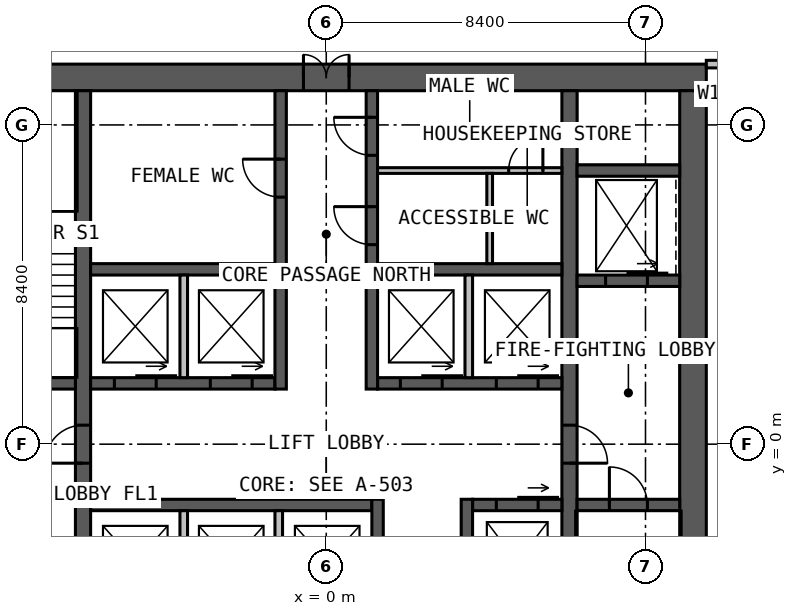
"""IFC4 building model, lengths in metres.
Left out: names, types, materials, properties, quantities, classifications, styles, units other than length and angle.
Written with IfcOpenShell. Run it as: python <this file> out.ifc"""

import sys

from ifc_helpers import new_model, si_unit, direction, frame, frame_2d, origin, place, context, subcontext, project, spatial, rectangle, extrude, element, fill, save


model = new_model("IFC4")
c1 = context("Model", 3, precision=1e-05, world=origin(), true_north=direction((0.0, 1.0)))
c2 = subcontext(c1, "Body", "Model", "MODEL_VIEW")
j1 = project(units=[si_unit("LENGTHUNIT", "METRE"), si_unit("PLANEANGLEUNIT", "RADIAN")], contexts=[c1])
p1 = place(None, origin())
s1 = spatial("IfcSite", under=j1, at=p1, CompositionType="ELEMENT")
p2 = place(p1, origin())
s2 = spatial("IfcBuilding", under=s1, at=p2, CompositionType="ELEMENT")
p3 = place(p2, frame((0.0, 0.0, 98.0)))
s3 = spatial("IfcBuildingStorey", under=s2, at=p3, CompositionType="ELEMENT", Elevation=98.0)
p4 = place(p3, frame((-10.0, 9.65, 0.0), z_axis=(0.0, 0.0, 1.0), x_axis=(1.0, 0.0, 0.0)))
e1 = element("IfcWall", 1, at=p4, inside=s3, PredefinedType="SOLIDWALL", context=c2, shape_type="SweptSolid", body=[
    extrude(rectangle(XDim=20.0, YDim=0.7, at=frame_2d((10.0, 0.0))), origin(), (0.0, 0.0, 1.0), 4.0),
])
p5 = place(p4, frame((9.4, 0.0, 0.0)))
e2 = element("IfcOpeningElement", 2, at=p5, cuts=e1, PredefinedType="OPENING", context=c2, shape_type="SweptSolid", body=[
    extrude(rectangle(XDim=1.2, YDim=2.2, at=frame_2d((0.6, 1.1))), frame((0.0, 0.36, 0.0), z_axis=(0.0, -1.0, 0.0), x_axis=(1.0, 0.0, 0.0)), (0.0, 0.0, 1.0), 0.72),
])
p6 = place(p3, frame((9.65, -9.3, 0.0), z_axis=(0.0, 0.0, 1.0), x_axis=(0.0, 1.0, 0.0)))
e3 = element("IfcWall", 3, at=p6, inside=s3, PredefinedType="SOLIDWALL", context=c2, shape_type="SweptSolid", body=[
    extrude(rectangle(XDim=18.6, YDim=0.7, at=frame_2d((9.3, 0.0))), origin(), (0.0, 0.0, 1.0), 4.0),
])
p7 = place(p3, frame((-6.4, -9.3, 0.0), z_axis=(0.0, 0.0, 1.0), x_axis=(0.0, 1.0, 0.0)))
e4 = element("IfcWall", 4, at=p7, inside=s3, PredefinedType="SOLIDWALL", context=c2, shape_type="SweptSolid", body=[
    extrude(rectangle(XDim=18.6, YDim=0.4, at=frame_2d((9.3, 0.0))), origin(), (0.0, 0.0, 1.0), 4.0),
])
p8 = place(p7, frame((8.8, 0.0, 0.0)))
e5 = element("IfcOpeningElement", 5, at=p8, cuts=e4, PredefinedType="OPENING", context=c2, shape_type="SweptSolid", body=[
    extrude(rectangle(XDim=1.0, YDim=2.2, at=frame_2d((0.5, 1.1))), frame((0.0, 0.21, 0.0), z_axis=(0.0, -1.0, 0.0), x_axis=(1.0, 0.0, 0.0)), (0.0, 0.0, 1.0), 0.42),
])
p9 = place(p3, frame((6.4, 9.3, 0.0), z_axis=(0.0, 0.0, 1.0), x_axis=(0.0, -1.0, 0.0)))
e6 = element("IfcWall", 6, at=p9, inside=s3, PredefinedType="SOLIDWALL", context=c2, shape_type="SweptSolid", body=[
    extrude(rectangle(XDim=18.6, YDim=0.4, at=frame_2d((9.3, 0.0))), origin(), (0.0, 0.0, 1.0), 4.0),
])
p10 = place(p9, frame((8.8, 0.0, 0.0)))
e7 = element("IfcOpeningElement", 7, at=p10, cuts=e6, PredefinedType="OPENING", context=c2, shape_type="SweptSolid", body=[
    extrude(rectangle(XDim=1.0, YDim=2.2, at=frame_2d((0.5, 1.1))), frame((0.0, 0.21, 0.0), z_axis=(0.0, -1.0, 0.0), x_axis=(1.0, 0.0, 0.0)), (0.0, 0.0, 1.0), 0.42),
])
p11 = place(p3, frame((-6.2, 1.6, 0.0), z_axis=(0.0, 0.0, 1.0), x_axis=(1.0, 0.0, 0.0)))
e8 = element("IfcWall", 8, at=p11, inside=s3, PredefinedType="SOLIDWALL", context=c2, shape_type="SweptSolid", body=[
    extrude(rectangle(XDim=4.85, YDim=0.3, at=frame_2d((2.425, 0.0))), origin(), (0.0, 0.0, 1.0), 4.0),
])
p12 = place(p11, frame((0.625, 0.0, 0.0)))
e9 = element("IfcOpeningElement", 9, at=p12, cuts=e8, PredefinedType="OPENING", context=c2, shape_type="SweptSolid", body=[
    extrude(rectangle(XDim=1.1, YDim=2.2, at=frame_2d((0.55, 1.1))), frame((0.0, 0.16, 0.0), z_axis=(0.0, -1.0, 0.0), x_axis=(1.0, 0.0, 0.0)), (0.0, 0.0, 1.0), 0.32),
])
p13 = place(p11, frame((3.15, 0.0, 0.0)))
e10 = element("IfcOpeningElement", 10, at=p13, cuts=e8, PredefinedType="OPENING", context=c2, shape_type="SweptSolid", body=[
    extrude(rectangle(XDim=1.1, YDim=2.2, at=frame_2d((0.55, 1.1))), frame((0.0, 0.16, 0.0), z_axis=(0.0, -1.0, 0.0), x_axis=(1.0, 0.0, 0.0)), (0.0, 0.0, 1.0), 0.32),
])
p14 = place(p3, frame((1.35, 1.6, 0.0), z_axis=(0.0, 0.0, 1.0), x_axis=(1.0, 0.0, 0.0)))
e11 = element("IfcWall", 11, at=p14, inside=s3, PredefinedType="SOLIDWALL", context=c2, shape_type="SweptSolid", body=[
    extrude(rectangle(XDim=4.85, YDim=0.3, at=frame_2d((2.425, 0.0))), origin(), (0.0, 0.0, 1.0), 4.0),
])
p15 = place(p14, frame((0.6, 0.0, 0.0)))
e12 = element("IfcOpeningElement", 12, at=p15, cuts=e11, PredefinedType="OPENING", context=c2, shape_type="SweptSolid", body=[
    extrude(rectangle(XDim=1.1, YDim=2.2, at=frame_2d((0.55, 1.1))), frame((0.0, 0.16, 0.0), z_axis=(0.0, -1.0, 0.0), x_axis=(1.0, 0.0, 0.0)), (0.0, 0.0, 1.0), 0.32),
])
p16 = place(p14, frame((3.125, 0.0, 0.0)))
e13 = element("IfcOpeningElement", 13, at=p16, cuts=e11, PredefinedType="OPENING", context=c2, shape_type="SweptSolid", body=[
    extrude(rectangle(XDim=1.1, YDim=2.2, at=frame_2d((0.55, 1.1))), frame((0.0, 0.16, 0.0), z_axis=(0.0, -1.0, 0.0), x_axis=(1.0, 0.0, 0.0)), (0.0, 0.0, 1.0), 0.32),
])
for number, where, z_axis, x_axis in (
    (14, (-6.2, 4.6, 0.0), (0.0, 0.0, 1.0), (1.0, 0.0, 0.0)),
    (15, (1.35, 4.6, 0.0), (0.0, 0.0, 1.0), (1.0, 0.0, 0.0)),
):
    element("IfcWall", number, at=place(p3, frame(where, z_axis=z_axis, x_axis=x_axis)), inside=s3, PredefinedType="SOLIDWALL", context=c2, shape_type="SweptSolid", body=[
        extrude(rectangle(XDim=4.85, YDim=0.3, at=frame_2d((2.425, 0.0))), origin(), (0.0, 0.0, 1.0), 4.0),
    ])
p17 = place(p3, frame((-1.2, 1.45, 0.0), z_axis=(0.0, 0.0, 1.0), x_axis=(0.0, 1.0, 0.0)))
e16 = element("IfcWall", 16, at=p17, inside=s3, PredefinedType="SOLIDWALL", context=c2, shape_type="SweptSolid", body=[
    extrude(rectangle(XDim=7.85, YDim=0.3, at=frame_2d((3.925, 0.0))), origin(), (0.0, 0.0, 1.0), 4.0),
])
p18 = place(p17, frame((5.05, 0.0, 0.0)))
e17 = element("IfcOpeningElement", 17, at=p18, cuts=e16, PredefinedType="OPENING", context=c2, shape_type="SweptSolid", body=[
    extrude(rectangle(XDim=1.0, YDim=2.2, at=frame_2d((0.5, 1.1))), frame((0.0, 0.16, 0.0), z_axis=(0.0, -1.0, 0.0), x_axis=(1.0, 0.0, 0.0)), (0.0, 0.0, 1.0), 0.32),
])
p19 = place(p3, frame((1.2, 1.45, 0.0), z_axis=(0.0, 0.0, 1.0), x_axis=(0.0, 1.0, 0.0)))
e18 = element("IfcWall", 18, at=p19, inside=s3, PredefinedType="SOLIDWALL", context=c2, shape_type="SweptSolid", body=[
    extrude(rectangle(XDim=7.85, YDim=0.3, at=frame_2d((3.925, 0.0))), origin(), (0.0, 0.0, 1.0), 4.0),
])
p20 = place(p19, frame((3.8, 0.0, 0.0)))
e19 = element("IfcOpeningElement", 19, at=p20, cuts=e18, PredefinedType="OPENING", context=c2, shape_type="SweptSolid", body=[
    extrude(rectangle(XDim=1.0, YDim=2.2, at=frame_2d((0.5, 1.1))), frame((0.0, 0.16, 0.0), z_axis=(0.0, -1.0, 0.0), x_axis=(1.0, 0.0, 0.0)), (0.0, 0.0, 1.0), 0.32),
])
p21 = place(p19, frame((6.15, 0.0, 0.0)))
e20 = element("IfcOpeningElement", 20, at=p21, cuts=e18, PredefinedType="OPENING", context=c2, shape_type="SweptSolid", body=[
    extrude(rectangle(XDim=1.0, YDim=2.2, at=frame_2d((0.5, 1.1))), frame((0.0, 0.16, 0.0), z_axis=(0.0, -1.0, 0.0), x_axis=(1.0, 0.0, 0.0)), (0.0, 0.0, 1.0), 0.32),
])
p22 = place(p3, frame((-6.2, -1.6, 0.0), z_axis=(0.0, 0.0, 1.0), x_axis=(1.0, 0.0, 0.0)))
e21 = element("IfcWall", 21, at=p22, inside=s3, PredefinedType="SOLIDWALL", context=c2, shape_type="SweptSolid", body=[
    extrude(rectangle(XDim=7.4, YDim=0.3, at=frame_2d((3.7, 0.0))), origin(), (0.0, 0.0, 1.0), 4.0),
])
p23 = place(p3, frame((3.85, -1.6, 0.0), z_axis=(0.0, 0.0, 1.0), x_axis=(1.0, 0.0, 0.0)))
e22 = element("IfcWall", 22, at=p23, inside=s3, PredefinedType="SOLIDWALL", context=c2, shape_type="SweptSolid", body=[
    extrude(rectangle(XDim=2.35, YDim=0.3, at=frame_2d((1.175, 0.0))), origin(), (0.0, 0.0, 1.0), 4.0),
])
p24 = place(p23, frame((0.625, 0.0, 0.0)))
e23 = element("IfcOpeningElement", 23, at=p24, cuts=e22, PredefinedType="OPENING", context=c2, shape_type="SweptSolid", body=[
    extrude(rectangle(XDim=1.1, YDim=2.2, at=frame_2d((0.55, 1.1))), frame((0.0, 0.16, 0.0), z_axis=(0.0, -1.0, 0.0), x_axis=(1.0, 0.0, 0.0)), (0.0, 0.0, 1.0), 0.32),
])
p25 = place(p3, frame((1.35, -1.45, 0.0), z_axis=(0.0, 0.0, 1.0), x_axis=(0.0, -1.0, 0.0)))
e24 = element("IfcWall", 24, at=p25, inside=s3, PredefinedType="SOLIDWALL", context=c2, shape_type="SweptSolid", body=[
    extrude(rectangle(XDim=7.85, YDim=0.3, at=frame_2d((3.925, 0.0))), origin(), (0.0, 0.0, 1.0), 4.0),
])
p26 = place(p25, frame((5.85, 0.0, 0.0)))
e25 = element("IfcOpeningElement", 25, at=p26, cuts=e24, PredefinedType="OPENING", context=c2, shape_type="SweptSolid", body=[
    extrude(rectangle(XDim=1.0, YDim=2.2, at=frame_2d((0.5, 1.1))), frame((0.0, 0.16, 0.0), z_axis=(0.0, -1.0, 0.0), x_axis=(1.0, 0.0, 0.0)), (0.0, 0.0, 1.0), 0.32),
])
p27 = place(p25, frame((3.525, 0.0, 0.0)))
e26 = element("IfcOpeningElement", 26, at=p27, cuts=e24, PredefinedType="OPENING", context=c2, shape_type="SweptSolid", body=[
    extrude(rectangle(XDim=0.9, YDim=2.2, at=frame_2d((0.45, 1.1))), frame((0.0, 0.16, 0.0), z_axis=(0.0, -1.0, 0.0), x_axis=(1.0, 0.0, 0.0)), (0.0, 0.0, 1.0), 0.32),
])
p28 = place(p3, frame((3.7, -1.45, 0.0), z_axis=(0.0, 0.0, 1.0), x_axis=(0.0, -1.0, 0.0)))
e27 = element("IfcWall", 27, at=p28, inside=s3, PredefinedType="SOLIDWALL", context=c2, shape_type="SweptSolid", body=[
    extrude(rectangle(XDim=7.85, YDim=0.3, at=frame_2d((3.925, 0.0))), origin(), (0.0, 0.0, 1.0), 4.0),
])
p29 = place(p28, frame((5.1, 0.0, 0.0)))
e28 = element("IfcOpeningElement", 28, at=p29, cuts=e27, PredefinedType="OPENING", context=c2, shape_type="SweptSolid", body=[
    extrude(rectangle(XDim=0.9, YDim=2.2, at=frame_2d((0.45, 1.1))), frame((0.0, 0.16, 0.0), z_axis=(0.0, -1.0, 0.0), x_axis=(1.0, 0.0, 0.0)), (0.0, 0.0, 1.0), 0.32),
])
p30 = place(p3, frame((-9.3, 1.6, 0.0), z_axis=(0.0, 0.0, 1.0), x_axis=(1.0, 0.0, 0.0)))
e29 = element("IfcWall", 29, at=p30, inside=s3, PredefinedType="SOLIDWALL", context=c2, shape_type="SweptSolid", body=[
    extrude(rectangle(XDim=2.7, YDim=0.3, at=frame_2d((1.35, 0.0))), origin(), (0.0, 0.0, 1.0), 4.0),
])
p31 = place(p30, frame((0.85, 0.0, 0.0)))
e30 = element("IfcOpeningElement", 30, at=p31, cuts=e29, PredefinedType="OPENING", context=c2, shape_type="SweptSolid", body=[
    extrude(rectangle(XDim=1.0, YDim=2.2, at=frame_2d((0.5, 1.1))), frame((0.0, 0.16, 0.0), z_axis=(0.0, -1.0, 0.0), x_axis=(1.0, 0.0, 0.0)), (0.0, 0.0, 1.0), 0.32),
])
p32 = place(p3, frame((6.6, -1.6, 0.0), z_axis=(0.0, 0.0, 1.0), x_axis=(1.0, 0.0, 0.0)))
e31 = element("IfcWall", 31, at=p32, inside=s3, PredefinedType="SOLIDWALL", context=c2, shape_type="SweptSolid", body=[
    extrude(rectangle(XDim=2.7, YDim=0.3, at=frame_2d((1.35, 0.0))), origin(), (0.0, 0.0, 1.0), 4.0),
])
p33 = place(p32, frame((0.85, 0.0, 0.0)))
e32 = element("IfcOpeningElement", 32, at=p33, cuts=e31, PredefinedType="OPENING", context=c2, shape_type="SweptSolid", body=[
    extrude(rectangle(XDim=1.0, YDim=2.2, at=frame_2d((0.5, 1.1))), frame((0.0, 0.16, 0.0), z_axis=(0.0, -1.0, 0.0), x_axis=(1.0, 0.0, 0.0)), (0.0, 0.0, 1.0), 0.32),
])
p34 = place(p3, frame((6.6, 4.3, 0.0), z_axis=(0.0, 0.0, 1.0), x_axis=(1.0, 0.0, 0.0)))
e33 = element("IfcWall", 33, at=p34, inside=s3, PredefinedType="SOLIDWALL", context=c2, shape_type="SweptSolid", body=[
    extrude(rectangle(XDim=2.7, YDim=0.3, at=frame_2d((1.35, 0.0))), origin(), (0.0, 0.0, 1.0), 4.0),
])
p35 = place(p34, frame((0.75, 0.0, 0.0)))
e34 = element("IfcOpeningElement", 34, at=p35, cuts=e33, PredefinedType="OPENING", context=c2, shape_type="SweptSolid", body=[
    extrude(rectangle(XDim=1.1, YDim=2.2, at=frame_2d((0.55, 1.1))), frame((0.0, 0.16, 0.0), z_axis=(0.0, -1.0, 0.0), x_axis=(1.0, 0.0, 0.0)), (0.0, 0.0, 1.0), 0.32),
])
p36 = place(p3, frame((6.6, 7.2, 0.0), z_axis=(0.0, 0.0, 1.0), x_axis=(1.0, 0.0, 0.0)))
e35 = element("IfcWall", 35, at=p36, inside=s3, PredefinedType="SOLIDWALL", context=c2, shape_type="SweptSolid", body=[
    extrude(rectangle(XDim=2.7, YDim=0.3, at=frame_2d((1.35, 0.0))), origin(), (0.0, 0.0, 1.0), 4.0),
])
for number, where, z_axis, x_axis in (
    (36, (-3.75, 1.75, 0.0), (0.0, 0.0, 1.0), (0.0, 1.0, 0.0)),
    (37, (3.75, 1.75, 0.0), (0.0, 0.0, 1.0), (0.0, 1.0, 0.0)),
    (38, (-3.75, -1.75, 0.0), (0.0, 0.0, 1.0), (0.0, -1.0, 0.0)),
    (39, (-1.25, -1.75, 0.0), (0.0, 0.0, 1.0), (0.0, -1.0, 0.0)),
):
    element("IfcWall", number, at=place(p3, frame(where, z_axis=z_axis, x_axis=x_axis)), inside=s3, PredefinedType="SOLIDWALL", context=c2, shape_type="SweptSolid", body=[
        extrude(rectangle(XDim=2.7, YDim=0.2, at=frame_2d((1.35, 0.0))), origin(), (0.0, 0.0, 1.0), 3.75),
    ])
p37 = place(p3, frame((1.35, 7.2, 0.0), z_axis=(0.0, 0.0, 1.0), x_axis=(1.0, 0.0, 0.0)))
e40 = element("IfcWall", 40, at=p37, inside=s3, PredefinedType="PARTITIONING", context=c2, shape_type="SweptSolid", body=[
    extrude(rectangle(XDim=4.85, YDim=0.15, at=frame_2d((2.425, 0.0))), origin(), (0.0, 0.0, 1.0), 3.75),
])
p38 = place(p37, frame((3.45, 0.0, 0.0)))
e41 = element("IfcOpeningElement", 41, at=p38, cuts=e40, PredefinedType="OPENING", context=c2, shape_type="SweptSolid", body=[
    extrude(rectangle(XDim=0.9, YDim=2.2, at=frame_2d((0.45, 1.1))), frame((0.0, 0.085, 0.0), z_axis=(0.0, -1.0, 0.0), x_axis=(1.0, 0.0, 0.0)), (0.0, 0.0, 1.0), 0.17),
])
p39 = place(p3, frame((4.3, 4.75, 0.0), z_axis=(0.0, 0.0, 1.0), x_axis=(0.0, 1.0, 0.0)))
e42 = element("IfcWall", 42, at=p39, inside=s3, PredefinedType="PARTITIONING", context=c2, shape_type="SweptSolid", body=[
    extrude(rectangle(XDim=2.375, YDim=0.15, at=frame_2d((1.188, 0.0))), origin(), (0.0, 0.0, 1.0), 3.75),
])
p40 = place(p3, frame((10.0, 10.0, 0.0), z_axis=(0.0, 0.0, 1.0), x_axis=(1.0, 0.0, 0.0)))
e43 = element("IfcWall", 43, at=p40, inside=s3, PredefinedType="PARTITIONING", context=c2, shape_type="SweptSolid", body=[
    extrude(rectangle(XDim=2.0, YDim=0.2, at=frame_2d((1.0, 0.0))), origin(), (0.0, 0.0, 1.0), 3.8),
])
p41 = place(p40, frame((0.5, 0.0, 0.0)))
e44 = element("IfcOpeningElement", 44, at=p41, cuts=e43, PredefinedType="OPENING", context=c2, shape_type="SweptSolid", body=[
    extrude(rectangle(XDim=1.0, YDim=2.2, at=frame_2d((0.5, 1.1))), frame((0.0, 0.11, 0.0), z_axis=(0.0, -1.0, 0.0), x_axis=(1.0, 0.0, 0.0)), (0.0, 0.0, 1.0), 0.22),
])
p42 = place(p5, origin())
e45 = element("IfcDoor", 45, at=p42, inside=s3, OperationType="DOUBLE_DOOR_SINGLE_SWING", PredefinedType="DOOR", context=c2, shape_type="SweptSolid", body=[
    extrude(rectangle(XDim=1.2, YDim=2.2, at=frame_2d((0.6, 1.1))), frame((0.0, 0.025, 0.0), z_axis=(0.0, -1.0, 0.0), x_axis=(1.0, 0.0, 0.0)), (0.0, 0.0, 1.0), 0.05),
])
fill(e2, e45)
p43 = place(p8, origin())
e46 = element("IfcDoor", 46, at=p43, inside=s3, OperationType="SINGLE_SWING_LEFT", PredefinedType="DOOR", context=c2, shape_type="SweptSolid", body=[
    extrude(rectangle(XDim=1.0, YDim=2.2, at=frame_2d((0.5, 1.1))), frame((0.0, 0.025, 0.0), z_axis=(0.0, -1.0, 0.0), x_axis=(1.0, 0.0, 0.0)), (0.0, 0.0, 1.0), 0.05),
])
fill(e5, e46)
p44 = place(p10, origin())
e47 = element("IfcDoor", 47, at=p44, inside=s3, OperationType="SINGLE_SWING_RIGHT", PredefinedType="DOOR", context=c2, shape_type="SweptSolid", body=[
    extrude(rectangle(XDim=1.0, YDim=2.2, at=frame_2d((0.5, 1.1))), frame((0.0, 0.025, 0.0), z_axis=(0.0, -1.0, 0.0), x_axis=(1.0, 0.0, 0.0)), (0.0, 0.0, 1.0), 0.05),
])
fill(e7, e47)
p45 = place(p33, origin())
e48 = element("IfcDoor", 48, at=p45, inside=s3, OperationType="SINGLE_SWING_LEFT", PredefinedType="DOOR", context=c2, shape_type="SweptSolid", body=[
    extrude(rectangle(XDim=1.0, YDim=2.2, at=frame_2d((0.5, 1.1))), frame((0.0, 0.025, 0.0), z_axis=(0.0, -1.0, 0.0), x_axis=(1.0, 0.0, 0.0)), (0.0, 0.0, 1.0), 0.05),
])
fill(e32, e48)
p46 = place(p18, origin())
e49 = element("IfcDoor", 49, at=p46, inside=s3, OperationType="SINGLE_SWING_RIGHT", PredefinedType="DOOR", context=c2, shape_type="SweptSolid", body=[
    extrude(rectangle(XDim=1.0, YDim=2.2, at=frame_2d((0.5, 1.1))), frame((0.0, 0.025, 0.0), z_axis=(0.0, -1.0, 0.0), x_axis=(1.0, 0.0, 0.0)), (0.0, 0.0, 1.0), 0.05),
])
fill(e17, e49)
p47 = place(p20, origin())
e50 = element("IfcDoor", 50, at=p47, inside=s3, OperationType="SINGLE_SWING_RIGHT", PredefinedType="DOOR", context=c2, shape_type="SweptSolid", body=[
    extrude(rectangle(XDim=1.0, YDim=2.2, at=frame_2d((0.5, 1.1))), frame((0.0, 0.025, 0.0), z_axis=(0.0, -1.0, 0.0), x_axis=(1.0, 0.0, 0.0)), (0.0, 0.0, 1.0), 0.05),
])
fill(e19, e50)
p48 = place(p21, origin())
e51 = element("IfcDoor", 51, at=p48, inside=s3, OperationType="SINGLE_SWING_RIGHT", PredefinedType="DOOR", context=c2, shape_type="SweptSolid", body=[
    extrude(rectangle(XDim=1.0, YDim=2.2, at=frame_2d((0.5, 1.1))), frame((0.0, 0.025, 0.0), z_axis=(0.0, -1.0, 0.0), x_axis=(1.0, 0.0, 0.0)), (0.0, 0.0, 1.0), 0.05),
])
fill(e20, e51)
p49 = place(p38, origin())
e52 = element("IfcDoor", 52, at=p49, inside=s3, OperationType="SINGLE_SWING_RIGHT", PredefinedType="DOOR", context=c2, shape_type="SweptSolid", body=[
    extrude(rectangle(XDim=0.9, YDim=2.2, at=frame_2d((0.45, 1.1))), frame((0.0, 0.025, 0.0), z_axis=(0.0, -1.0, 0.0), x_axis=(1.0, 0.0, 0.0)), (0.0, 0.0, 1.0), 0.05),
])
fill(e41, e52)
p50 = place(p12, origin())
e53 = element("IfcDoor", 53, at=p50, inside=s3, OperationType="SLIDING_TO_LEFT", PredefinedType="DOOR", context=c2, shape_type="SweptSolid", body=[
    extrude(rectangle(XDim=1.1, YDim=2.2, at=frame_2d((0.55, 1.1))), frame((0.0, 0.025, 0.0), z_axis=(0.0, -1.0, 0.0), x_axis=(1.0, 0.0, 0.0)), (0.0, 0.0, 1.0), 0.05),
])
fill(e9, e53)
p51 = place(p13, origin())
e54 = element("IfcDoor", 54, at=p51, inside=s3, OperationType="SLIDING_TO_LEFT", PredefinedType="DOOR", context=c2, shape_type="SweptSolid", body=[
    extrude(rectangle(XDim=1.1, YDim=2.2, at=frame_2d((0.55, 1.1))), frame((0.0, 0.025, 0.0), z_axis=(0.0, -1.0, 0.0), x_axis=(1.0, 0.0, 0.0)), (0.0, 0.0, 1.0), 0.05),
])
fill(e10, e54)
p52 = place(p15, origin())
e55 = element("IfcDoor", 55, at=p52, inside=s3, OperationType="SLIDING_TO_LEFT", PredefinedType="DOOR", context=c2, shape_type="SweptSolid", body=[
    extrude(rectangle(XDim=1.1, YDim=2.2, at=frame_2d((0.55, 1.1))), frame((0.0, 0.025, 0.0), z_axis=(0.0, -1.0, 0.0), x_axis=(1.0, 0.0, 0.0)), (0.0, 0.0, 1.0), 0.05),
])
fill(e12, e55)
p53 = place(p16, origin())
e56 = element("IfcDoor", 56, at=p53, inside=s3, OperationType="SLIDING_TO_LEFT", PredefinedType="DOOR", context=c2, shape_type="SweptSolid", body=[
    extrude(rectangle(XDim=1.1, YDim=2.2, at=frame_2d((0.55, 1.1))), frame((0.0, 0.025, 0.0), z_axis=(0.0, -1.0, 0.0), x_axis=(1.0, 0.0, 0.0)), (0.0, 0.0, 1.0), 0.05),
])
fill(e13, e56)
p54 = place(p24, origin())
e57 = element("IfcDoor", 57, at=p54, inside=s3, OperationType="SLIDING_TO_LEFT", PredefinedType="DOOR", context=c2, shape_type="SweptSolid", body=[
    extrude(rectangle(XDim=1.1, YDim=2.2, at=frame_2d((0.55, 1.1))), frame((0.0, 0.025, 0.0), z_axis=(0.0, -1.0, 0.0), x_axis=(1.0, 0.0, 0.0)), (0.0, 0.0, 1.0), 0.05),
])
fill(e23, e57)
p55 = place(p35, origin())
e58 = element("IfcDoor", 58, at=p55, inside=s3, OperationType="SLIDING_TO_LEFT", PredefinedType="DOOR", context=c2, shape_type="SweptSolid", body=[
    extrude(rectangle(XDim=1.1, YDim=2.2, at=frame_2d((0.55, 1.1))), frame((0.0, 0.025, 0.0), z_axis=(0.0, -1.0, 0.0), x_axis=(1.0, 0.0, 0.0)), (0.0, 0.0, 1.0), 0.05),
])
fill(e34, e58)
save(model, sys.argv[1])
